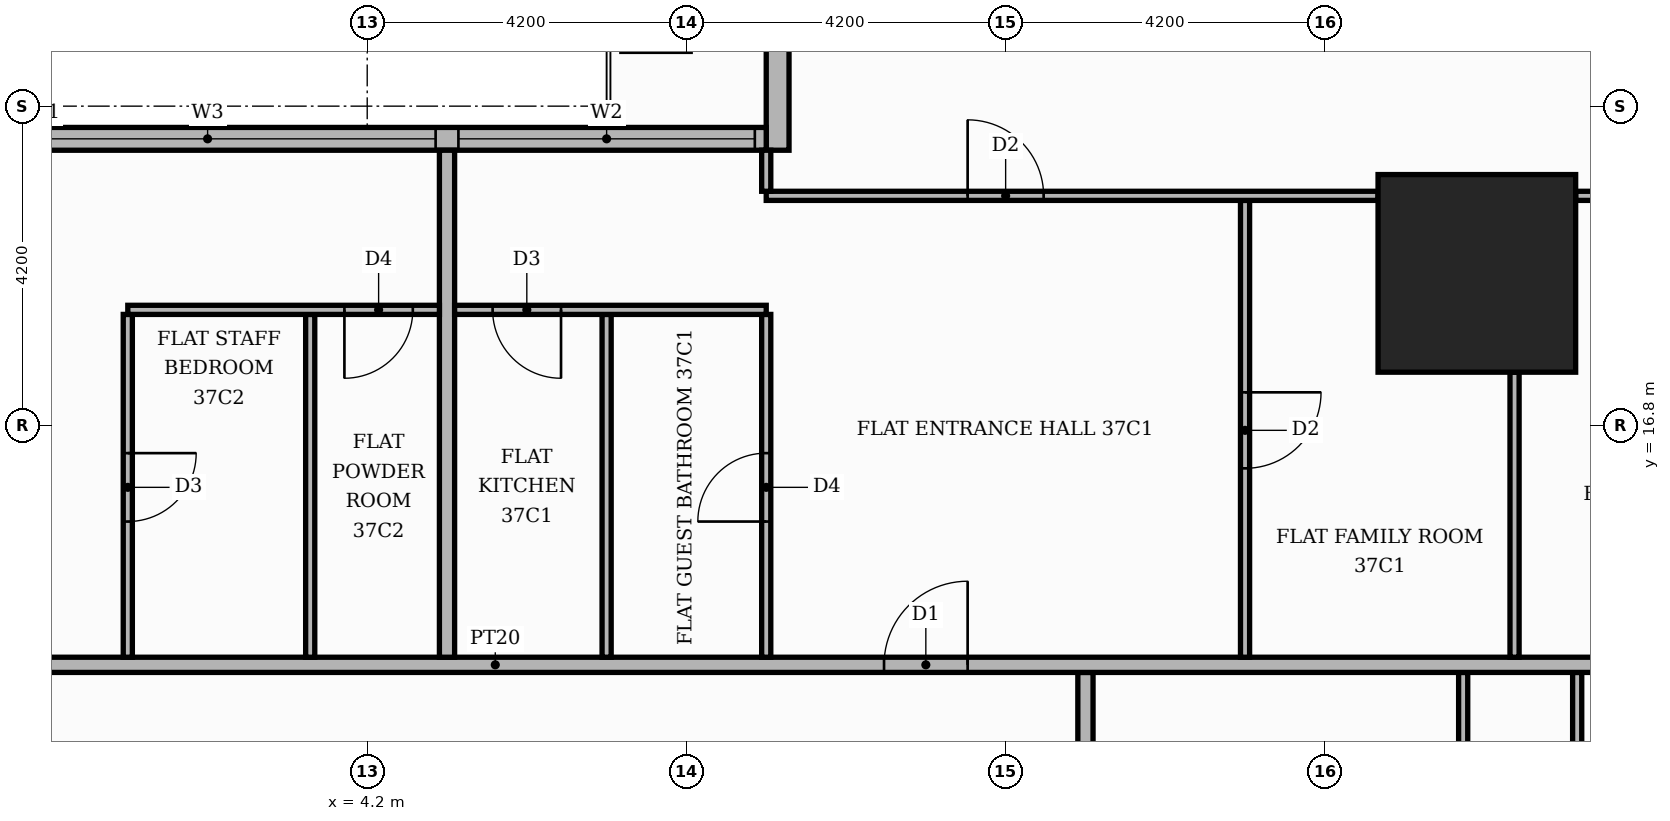
"""IFC4 building model, lengths in metres.
Left out: names, types, materials, properties, quantities, classifications, styles, units other than length and angle.
Written with IfcOpenShell. Run it as: python <this file> out.ifc"""

import sys

from ifc_helpers import new_model, si_unit, direction, frame, frame_2d, origin, origin_2d, place, context, subcontext, project, spatial, rectangle, extrude, element, fill, save


model = new_model("IFC4")
c1 = context("Model", 3, precision=1e-05, world=origin(), true_north=direction((0.0, 1.0)))
c2 = subcontext(c1, "Body", "Model", "MODEL_VIEW")
j1 = project(units=[si_unit("LENGTHUNIT", "METRE"), si_unit("PLANEANGLEUNIT", "RADIAN")], contexts=[c1])
p1 = place(None, origin())
s1 = spatial("IfcSite", under=j1, at=p1, CompositionType="ELEMENT")
p2 = place(p1, origin())
s2 = spatial("IfcBuilding", under=s1, at=p2, CompositionType="ELEMENT")
p3 = place(p2, frame((0.0, 0.0, 157.2)))
s3 = spatial("IfcBuildingStorey", under=s2, at=p3, CompositionType="ELEMENT", Elevation=157.2)
p4 = place(p3, frame((18.8, 18.8, 0.0), z_axis=(0.0, 0.0, 1.0), x_axis=(1.0, 0.0, 0.0)))
e1 = element("IfcColumn", 1, at=p4, inside=s3, PredefinedType="COLUMN", context=c2, shape_type="SweptSolid", body=[
    extrude(rectangle(XDim=2.6, YDim=2.6, at=origin_2d()), origin(), (0.0, 0.0, 1.0), 3.9),
])
p5 = place(p3, frame((9.6, 25.42, 0.0), z_axis=(0.0, 0.0, 1.0), x_axis=(0.0, -1.0, 0.0)))
e2 = element("IfcWall", 2, at=p5, inside=s3, PredefinedType="STANDARD", context=c2, shape_type="SweptSolid", body=[
    extrude(rectangle(XDim=5.0, YDim=0.3, at=frame_2d((2.5, 0.0))), origin(), (0.0, 0.0, 1.0), 3.48),
])
p6 = place(p5, frame((1.42, 0.0, 0.0)))
e3 = element("IfcOpeningElement", 3, at=p6, cuts=e2, PredefinedType="OPENING", context=c2, shape_type="SweptSolid", body=[
    extrude(rectangle(XDim=1.8, YDim=2.4, at=frame_2d((0.9, 1.2))), frame((0.0, 0.16, 0.0), z_axis=(0.0, -1.0, 0.0), x_axis=(1.0, 0.0, 0.0)), (0.0, 0.0, 1.0), 0.32),
])
p7 = place(p3, frame((9.45, 20.57, 0.0), z_axis=(0.0, 0.0, 1.0), x_axis=(-1.0, 0.0, 0.0)))
e4 = element("IfcWall", 4, at=p7, inside=s3, PredefinedType="STANDARD", context=c2, shape_type="SweptSolid", body=[
    extrude(rectangle(XDim=19.2, YDim=0.3, at=frame_2d((9.6, 0.0))), origin(), (0.0, 0.0, 1.0), 3.48),
])
p8 = place(p7, frame((0.15, 0.0, 0.9)))
e5 = element("IfcOpeningElement", 5, at=p8, cuts=e4, PredefinedType="OPENING", context=c2, shape_type="SweptSolid", body=[
    extrude(rectangle(XDim=3.9, YDim=2.1, at=frame_2d((1.95, 1.05))), frame((0.0, 0.16, 0.0), z_axis=(0.0, -1.0, 0.0), x_axis=(1.0, 0.0, 0.0)), (0.0, 0.0, 1.0), 0.32),
])
p9 = place(p7, frame((4.35, 0.0, 0.9)))
e6 = element("IfcOpeningElement", 6, at=p9, cuts=e4, PredefinedType="OPENING", context=c2, shape_type="SweptSolid", body=[
    extrude(rectangle(XDim=6.0, YDim=2.1, at=frame_2d((3.0, 1.05))), frame((0.0, 0.16, 0.0), z_axis=(0.0, -1.0, 0.0), x_axis=(1.0, 0.0, 0.0)), (0.0, 0.0, 1.0), 0.32),
])
p10 = place(p7, frame((10.65, 0.0, 0.9)))
e7 = element("IfcOpeningElement", 7, at=p10, cuts=e4, PredefinedType="OPENING", context=c2, shape_type="SweptSolid", body=[
    extrude(rectangle(XDim=6.0, YDim=2.1, at=frame_2d((3.0, 1.05))), frame((0.0, 0.16, 0.0), z_axis=(0.0, -1.0, 0.0), x_axis=(1.0, 0.0, 0.0)), (0.0, 0.0, 1.0), 0.32),
])
p11 = place(p7, frame((16.95, 0.0, 0.9)))
e8 = element("IfcOpeningElement", 8, at=p11, cuts=e4, PredefinedType="OPENING", context=c2, shape_type="SweptSolid", body=[
    extrude(rectangle(XDim=1.8, YDim=2.1, at=frame_2d((0.9, 1.05))), frame((0.0, 0.16, 0.0), z_axis=(0.0, -1.0, 0.0), x_axis=(1.0, 0.0, 0.0)), (0.0, 0.0, 1.0), 0.32),
])
p12 = place(p3, frame((18.62, 9.36, 0.0), z_axis=(0.0, 0.0, 1.0), x_axis=(0.0, 1.0, 0.0)))
e9 = element("IfcWall", 9, at=p12, inside=s3, PredefinedType="PARTITIONING", context=c2, shape_type="SweptSolid", body=[
    extrude(rectangle(XDim=4.19, YDim=0.12, at=frame_2d((2.095, 0.0))), origin(), (0.0, 0.0, 1.0), 3.48),
])
p13 = place(p12, frame((1.665, 0.0, 0.0)))
e10 = element("IfcOpeningElement", 10, at=p13, cuts=e9, PredefinedType="OPENING", context=c2, shape_type="SweptSolid", body=[
    extrude(rectangle(XDim=0.9, YDim=2.1, at=frame_2d((0.45, 1.05))), frame((0.0, 0.07, 0.0), z_axis=(0.0, -1.0, 0.0), x_axis=(1.0, 0.0, 0.0)), (0.0, 0.0, 1.0), 0.14),
])
p14 = place(p3, frame((13.65, 11.1, 0.0), z_axis=(0.0, 0.0, 1.0), x_axis=(0.0, 1.0, 0.0)))
e11 = element("IfcWall", 11, at=p14, inside=s3, PredefinedType="PARTITIONING", context=c2, shape_type="SweptSolid", body=[
    extrude(rectangle(XDim=2.45, YDim=0.2, at=frame_2d((1.225, 0.0))), origin(), (0.0, 0.0, 1.0), 3.48),
])
p15 = place(p3, frame((20.12, 11.61, 0.0), z_axis=(0.0, 0.0, 1.0), x_axis=(0.0, 1.0, 0.0)))
e12 = element("IfcWall", 12, at=p15, inside=s3, PredefinedType="PARTITIONING", context=c2, shape_type="SweptSolid", body=[
    extrude(rectangle(XDim=1.94, YDim=0.12, at=frame_2d((0.97, 0.0))), origin(), (0.0, 0.0, 1.0), 3.48),
])
p16 = place(p3, frame((-13.65, 13.65, 0.0), z_axis=(0.0, 0.0, 1.0), x_axis=(1.0, 0.0, 0.0)))
e13 = element("IfcWall", 13, at=p16, inside=s3, PredefinedType="PARTITIONING", context=c2, shape_type="SweptSolid", body=[
    extrude(rectangle(XDim=39.07, YDim=0.2, at=frame_2d((19.535, 0.0))), origin(), (0.0, 0.0, 1.0), 3.48),
])
p17 = place(p16, frame((24.65, 0.0, 0.0)))
e14 = element("IfcOpeningElement", 14, at=p17, cuts=e13, PredefinedType="OPENING", context=c2, shape_type="SweptSolid", body=[
    extrude(rectangle(XDim=1.1, YDim=2.4, at=frame_2d((0.55, 1.2))), frame((0.0, 0.11, 0.0), z_axis=(0.0, -1.0, 0.0), x_axis=(1.0, 0.0, 0.0)), (0.0, 0.0, 1.0), 0.22),
])
p18 = place(p16, frame((12.05, 0.0, 0.0)))
e15 = element("IfcOpeningElement", 15, at=p18, cuts=e13, PredefinedType="OPENING", context=c2, shape_type="SweptSolid", body=[
    extrude(rectangle(XDim=1.1, YDim=2.4, at=frame_2d((0.55, 1.2))), frame((0.0, 0.11, 0.0), z_axis=(0.0, -1.0, 0.0), x_axis=(1.0, 0.0, 0.0)), (0.0, 0.0, 1.0), 0.22),
])
p19 = place(p3, frame((1.05, 13.75, 0.0), z_axis=(0.0, 0.0, 1.0), x_axis=(0.0, 1.0, 0.0)))
e16 = element("IfcWall", 16, at=p19, inside=s3, PredefinedType="PARTITIONING", context=c2, shape_type="SweptSolid", body=[
    extrude(rectangle(XDim=4.51, YDim=0.12, at=frame_2d((2.255, 0.0))), origin(), (0.0, 0.0, 1.0), 3.48),
])
p20 = place(p19, frame((1.785, 0.0, 0.0)))
e17 = element("IfcOpeningElement", 17, at=p20, cuts=e16, PredefinedType="OPENING", context=c2, shape_type="SweptSolid", body=[
    extrude(rectangle(XDim=0.9, YDim=2.1, at=frame_2d((0.45, 1.05))), frame((0.0, 0.07, 0.0), z_axis=(0.0, -1.0, 0.0), x_axis=(1.0, 0.0, 0.0)), (0.0, 0.0, 1.0), 0.14),
])
p21 = place(p3, frame((3.45, 13.75, 0.0), z_axis=(0.0, 0.0, 1.0), x_axis=(0.0, 1.0, 0.0)))
e18 = element("IfcWall", 18, at=p21, inside=s3, PredefinedType="PARTITIONING", context=c2, shape_type="SweptSolid", body=[
    extrude(rectangle(XDim=4.51, YDim=0.12, at=frame_2d((2.255, 0.0))), origin(), (0.0, 0.0, 1.0), 3.48),
])
p22 = place(p3, frame((5.25, 13.75, 0.0), z_axis=(0.0, 0.0, 1.0), x_axis=(0.0, 1.0, 0.0)))
e19 = element("IfcWall", 19, at=p22, inside=s3, PredefinedType="PARTITIONING", context=c2, shape_type="SweptSolid", body=[
    extrude(rectangle(XDim=6.67, YDim=0.2, at=frame_2d((3.335, 0.0))), origin(), (0.0, 0.0, 1.0), 3.48),
])
p23 = place(p3, frame((7.35, 13.75, 0.0), z_axis=(0.0, 0.0, 1.0), x_axis=(0.0, 1.0, 0.0)))
e20 = element("IfcWall", 20, at=p23, inside=s3, PredefinedType="PARTITIONING", context=c2, shape_type="SweptSolid", body=[
    extrude(rectangle(XDim=4.51, YDim=0.12, at=frame_2d((2.255, 0.0))), origin(), (0.0, 0.0, 1.0), 3.48),
])
p24 = place(p3, frame((9.45, 13.75, 0.0), z_axis=(0.0, 0.0, 1.0), x_axis=(0.0, 1.0, 0.0)))
e21 = element("IfcWall", 21, at=p24, inside=s3, PredefinedType="PARTITIONING", context=c2, shape_type="SweptSolid", body=[
    extrude(rectangle(XDim=4.51, YDim=0.12, at=frame_2d((2.255, 0.0))), origin(), (0.0, 0.0, 1.0), 3.48),
])
p25 = place(p24, frame((1.785, 0.0, 0.0)))
e22 = element("IfcOpeningElement", 22, at=p25, cuts=e21, PredefinedType="OPENING", context=c2, shape_type="SweptSolid", body=[
    extrude(rectangle(XDim=0.9, YDim=2.1, at=frame_2d((0.45, 1.05))), frame((0.0, 0.07, 0.0), z_axis=(0.0, -1.0, 0.0), x_axis=(1.0, 0.0, 0.0)), (0.0, 0.0, 1.0), 0.14),
])
p26 = place(p3, frame((15.75, 13.75, 0.0), z_axis=(0.0, 0.0, 1.0), x_axis=(0.0, 1.0, 0.0)))
e23 = element("IfcWall", 23, at=p26, inside=s3, PredefinedType="PARTITIONING", context=c2, shape_type="SweptSolid", body=[
    extrude(rectangle(XDim=6.01, YDim=0.12, at=frame_2d((3.005, 0.0))), origin(), (0.0, 0.0, 1.0), 3.48),
])
p27 = place(p26, frame((2.485, 0.0, 0.0)))
e24 = element("IfcOpeningElement", 24, at=p27, cuts=e23, PredefinedType="OPENING", context=c2, shape_type="SweptSolid", body=[
    extrude(rectangle(XDim=1.0, YDim=2.1, at=frame_2d((0.5, 1.05))), frame((0.0, 0.07, 0.0), z_axis=(0.0, -1.0, 0.0), x_axis=(1.0, 0.0, 0.0)), (0.0, 0.0, 1.0), 0.14),
])
p28 = place(p3, frame((19.296, 13.75, 0.0), z_axis=(0.0, 0.0, 1.0), x_axis=(0.0, 1.0, 0.0)))
e25 = element("IfcWall", 25, at=p28, inside=s3, PredefinedType="PARTITIONING", context=c2, shape_type="SweptSolid", body=[
    extrude(rectangle(XDim=3.75, YDim=0.12, at=frame_2d((1.875, 0.0))), origin(), (0.0, 0.0, 1.0), 3.48),
])
p29 = place(p3, frame((1.05, 18.32, 0.0), z_axis=(0.0, 0.0, 1.0), x_axis=(1.0, 0.0, 0.0)))
e26 = element("IfcWall", 26, at=p29, inside=s3, PredefinedType="PARTITIONING", context=c2, shape_type="SweptSolid", body=[
    extrude(rectangle(XDim=4.1, YDim=0.12, at=frame_2d((2.05, 0.0))), origin(), (0.0, 0.0, 1.0), 3.48),
])
p30 = place(p29, frame((2.85, 0.0, 0.0)))
e27 = element("IfcOpeningElement", 27, at=p30, cuts=e26, PredefinedType="OPENING", context=c2, shape_type="SweptSolid", body=[
    extrude(rectangle(XDim=0.9, YDim=2.1, at=frame_2d((0.45, 1.05))), frame((0.0, 0.07, 0.0), z_axis=(0.0, -1.0, 0.0), x_axis=(1.0, 0.0, 0.0)), (0.0, 0.0, 1.0), 0.14),
])
p31 = place(p3, frame((5.35, 18.32, 0.0), z_axis=(0.0, 0.0, 1.0), x_axis=(1.0, 0.0, 0.0)))
e28 = element("IfcWall", 28, at=p31, inside=s3, PredefinedType="PARTITIONING", context=c2, shape_type="SweptSolid", body=[
    extrude(rectangle(XDim=4.1, YDim=0.12, at=frame_2d((2.05, 0.0))), origin(), (0.0, 0.0, 1.0), 3.48),
])
p32 = place(p31, frame((0.5, 0.0, 0.0)))
e29 = element("IfcOpeningElement", 29, at=p32, cuts=e28, PredefinedType="OPENING", context=c2, shape_type="SweptSolid", body=[
    extrude(rectangle(XDim=0.9, YDim=2.1, at=frame_2d((0.45, 1.05))), frame((0.0, 0.07, 0.0), z_axis=(0.0, -1.0, 0.0), x_axis=(1.0, 0.0, 0.0)), (0.0, 0.0, 1.0), 0.14),
])
p33 = place(p3, frame((9.45, 19.82, 0.0), z_axis=(0.0, 0.0, 1.0), x_axis=(1.0, 0.0, 0.0)))
e30 = element("IfcWall", 30, at=p33, inside=s3, PredefinedType="PARTITIONING", context=c2, shape_type="SweptSolid", body=[
    extrude(rectangle(XDim=8.05, YDim=0.12, at=frame_2d((4.025, 0.0))), origin(), (0.0, 0.0, 1.0), 3.48),
])
p34 = place(p33, frame((2.65, 0.0, 0.0)))
e31 = element("IfcOpeningElement", 31, at=p34, cuts=e30, PredefinedType="OPENING", context=c2, shape_type="SweptSolid", body=[
    extrude(rectangle(XDim=1.0, YDim=2.1, at=frame_2d((0.5, 1.05))), frame((0.0, 0.07, 0.0), z_axis=(0.0, -1.0, 0.0), x_axis=(1.0, 0.0, 0.0)), (0.0, 0.0, 1.0), 0.14),
])
p35 = place(p3, frame((20.1, 19.82, 0.0), z_axis=(0.0, 0.0, 1.0), x_axis=(1.0, 0.0, 0.0)))
e32 = element("IfcWall", 32, at=p35, inside=s3, PredefinedType="PARTITIONING", context=c2, shape_type="SweptSolid", body=[
    extrude(rectangle(XDim=5.32, YDim=0.12, at=frame_2d((2.66, 0.0))), origin(), (0.0, 0.0, 1.0), 3.48),
])
p36 = place(p35, frame((2.36, 0.0, 0.0)))
e33 = element("IfcOpeningElement", 33, at=p36, cuts=e32, PredefinedType="OPENING", context=c2, shape_type="SweptSolid", body=[
    extrude(rectangle(XDim=0.9, YDim=2.1, at=frame_2d((0.45, 1.05))), frame((0.0, 0.07, 0.0), z_axis=(0.0, -1.0, 0.0), x_axis=(1.0, 0.0, 0.0)), (0.0, 0.0, 1.0), 0.14),
])
p37 = place(p3, frame((9.45, 19.88, 0.0), z_axis=(0.0, 0.0, 1.0), x_axis=(0.0, 1.0, 0.0)))
e34 = element("IfcWall", 34, at=p37, inside=s3, PredefinedType="PARTITIONING", context=c2, shape_type="SweptSolid", body=[
    extrude(rectangle(XDim=0.54, YDim=0.12, at=frame_2d((0.27, 0.0))), origin(), (0.0, 0.0, 1.0), 3.48),
])
p38 = place(p8, origin())
e35 = element("IfcWindow", 35, at=p38, inside=s3, PartitioningType="SINGLE_PANEL", PredefinedType="WINDOW", context=c2, shape_type="SweptSolid", body=[
    extrude(rectangle(XDim=3.9, YDim=2.1, at=frame_2d((1.95, 1.05))), frame((0.0, 0.03, 0.0), z_axis=(0.0, -1.0, 0.0), x_axis=(1.0, 0.0, 0.0)), (0.0, 0.0, 1.0), 0.06),
])
fill(e5, e35)
p39 = place(p9, origin())
e36 = element("IfcWindow", 36, at=p39, inside=s3, PartitioningType="SINGLE_PANEL", PredefinedType="WINDOW", context=c2, shape_type="SweptSolid", body=[
    extrude(rectangle(XDim=6.0, YDim=2.1, at=frame_2d((3.0, 1.05))), frame((0.0, 0.03, 0.0), z_axis=(0.0, -1.0, 0.0), x_axis=(1.0, 0.0, 0.0)), (0.0, 0.0, 1.0), 0.06),
])
fill(e6, e36)
p40 = place(p17, origin())
e37 = element("IfcDoor", 37, at=p40, inside=s3, OperationType="SINGLE_SWING_RIGHT", PredefinedType="DOOR", context=c2, shape_type="SweptSolid", body=[
    extrude(rectangle(XDim=1.1, YDim=2.4, at=frame_2d((0.55, 1.2))), frame((0.0, 0.025, 0.0), z_axis=(0.0, -1.0, 0.0), x_axis=(1.0, 0.0, 0.0)), (0.0, 0.0, 1.0), 0.05),
])
fill(e14, e37)
p41 = place(p27, frame((1.0, 0.0, 0.0), z_axis=(0.0, 0.0, 1.0), x_axis=(-1.0, 0.0, 0.0)))
e38 = element("IfcDoor", 38, at=p41, inside=s3, OperationType="SINGLE_SWING_RIGHT", PredefinedType="DOOR", context=c2, shape_type="SweptSolid", body=[
    extrude(rectangle(XDim=1.0, YDim=2.1, at=frame_2d((0.5, 1.05))), frame((0.0, 0.025, 0.0), z_axis=(0.0, -1.0, 0.0), x_axis=(1.0, 0.0, 0.0)), (0.0, 0.0, 1.0), 0.05),
])
fill(e24, e38)
p42 = place(p25, origin())
e39 = element("IfcDoor", 39, at=p42, inside=s3, OperationType="SINGLE_SWING_LEFT", PredefinedType="DOOR", context=c2, shape_type="SweptSolid", body=[
    extrude(rectangle(XDim=0.9, YDim=2.1, at=frame_2d((0.45, 1.05))), frame((0.0, 0.025, 0.0), z_axis=(0.0, -1.0, 0.0), x_axis=(1.0, 0.0, 0.0)), (0.0, 0.0, 1.0), 0.05),
])
fill(e22, e39)
p43 = place(p32, frame((0.9, 0.0, 0.0), z_axis=(0.0, 0.0, 1.0), x_axis=(-1.0, 0.0, 0.0)))
e40 = element("IfcDoor", 40, at=p43, inside=s3, OperationType="SINGLE_SWING_RIGHT", PredefinedType="DOOR", context=c2, shape_type="SweptSolid", body=[
    extrude(rectangle(XDim=0.9, YDim=2.1, at=frame_2d((0.45, 1.05))), frame((0.0, 0.025, 0.0), z_axis=(0.0, -1.0, 0.0), x_axis=(1.0, 0.0, 0.0)), (0.0, 0.0, 1.0), 0.05),
])
fill(e29, e40)
p44 = place(p34, origin())
e41 = element("IfcDoor", 41, at=p44, inside=s3, OperationType="SINGLE_SWING_LEFT", PredefinedType="DOOR", context=c2, shape_type="SweptSolid", body=[
    extrude(rectangle(XDim=1.0, YDim=2.1, at=frame_2d((0.5, 1.05))), frame((0.0, 0.025, 0.0), z_axis=(0.0, -1.0, 0.0), x_axis=(1.0, 0.0, 0.0)), (0.0, 0.0, 1.0), 0.05),
])
fill(e31, e41)
p45 = place(p30, frame((0.9, 0.0, 0.0), z_axis=(0.0, 0.0, 1.0), x_axis=(-1.0, 0.0, 0.0)))
e42 = element("IfcDoor", 42, at=p45, inside=s3, OperationType="SINGLE_SWING_LEFT", PredefinedType="DOOR", context=c2, shape_type="SweptSolid", body=[
    extrude(rectangle(XDim=0.9, YDim=2.1, at=frame_2d((0.45, 1.05))), frame((0.0, 0.025, 0.0), z_axis=(0.0, -1.0, 0.0), x_axis=(1.0, 0.0, 0.0)), (0.0, 0.0, 1.0), 0.05),
])
fill(e27, e42)
p46 = place(p20, frame((0.9, 0.0, 0.0), z_axis=(0.0, 0.0, 1.0), x_axis=(-1.0, 0.0, 0.0)))
e43 = element("IfcDoor", 43, at=p46, inside=s3, OperationType="SINGLE_SWING_RIGHT", PredefinedType="DOOR", context=c2, shape_type="SweptSolid", body=[
    extrude(rectangle(XDim=0.9, YDim=2.1, at=frame_2d((0.45, 1.05))), frame((0.0, 0.025, 0.0), z_axis=(0.0, -1.0, 0.0), x_axis=(1.0, 0.0, 0.0)), (0.0, 0.0, 1.0), 0.05),
])
fill(e17, e43)
save(model, sys.argv[1])
